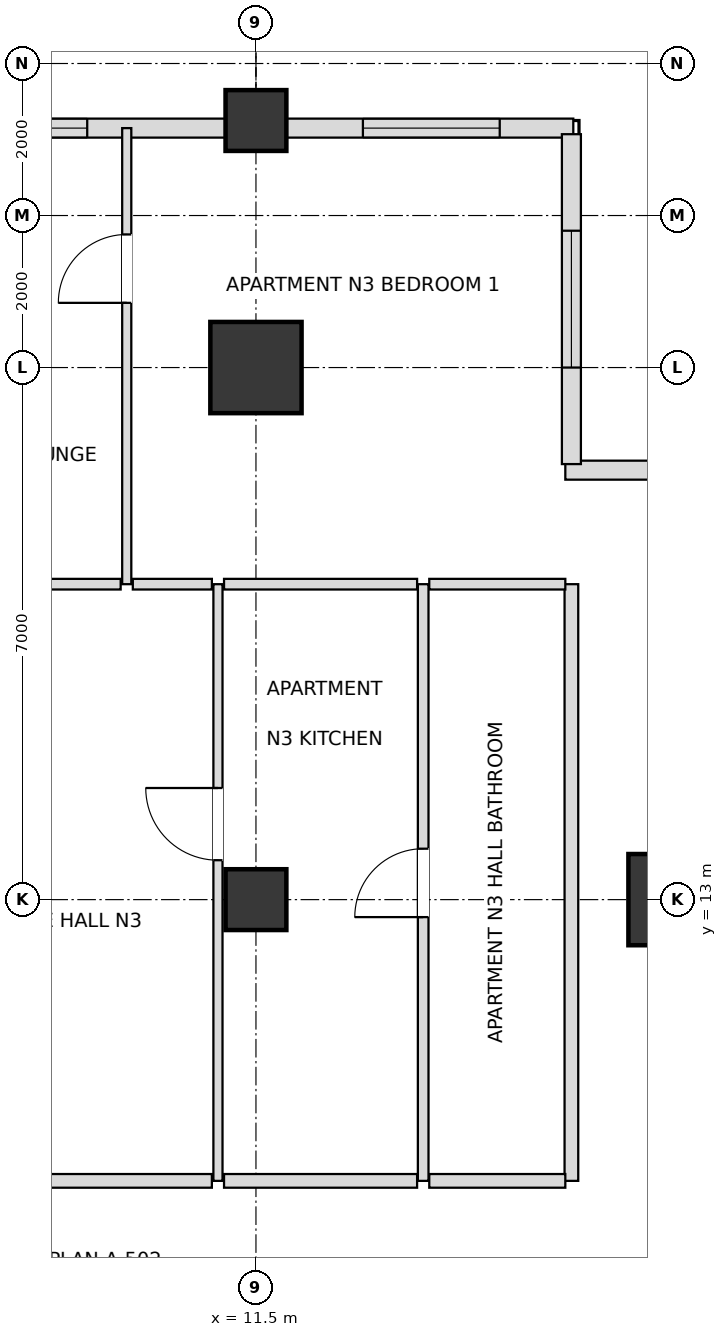
"""IFC4 building model, lengths in metres.
Left out: names, types, materials, properties, quantities, classifications, styles, units other than length and angle.
Written with IfcOpenShell. Run it as: python <this file> out.ifc"""

import sys

from ifc_helpers import new_model, si_unit, direction, frame, frame_2d, origin, origin_2d, place, context, subcontext, project, spatial, rectangle, extrude, element, fill, save


model = new_model("IFC4")
c1 = context("Model", 3, precision=1e-05, world=origin(), true_north=direction((0.0, 1.0)))
c2 = subcontext(c1, "Body", "Model", "MODEL_VIEW")
j1 = project(units=[si_unit("LENGTHUNIT", "METRE"), si_unit("PLANEANGLEUNIT", "RADIAN")], contexts=[c1])
p1 = place(None, origin())
s1 = spatial("IfcSite", under=j1, at=p1, CompositionType="ELEMENT")
p2 = place(p1, origin())
s2 = spatial("IfcBuilding", under=s1, at=p2, CompositionType="ELEMENT")
p3 = place(p2, frame((0.0, 0.0, 109.8)))
s3 = spatial("IfcBuildingStorey", under=s2, at=p3, CompositionType="ELEMENT", Elevation=109.8)
for number, where, z_axis, x_axis in (
    (1, (17.0, 13.0, 0.0), (0.0, 0.0, 1.0), (1.0, 0.0, 0.0)),
    (2, (11.5, 20.0, 0.0), (0.0, 0.0, 1.0), (1.0, 0.0, 0.0)),
):
    element("IfcColumn", number, at=place(p3, frame(where, z_axis=z_axis, x_axis=x_axis)), inside=s3, PredefinedType="USERDEFINED", context=c2, shape_type="SweptSolid", body=[
        extrude(rectangle(XDim=1.2, YDim=1.2, at=origin_2d()), origin(), (0.0, 0.0, 1.0), 3.6),
    ])
for number, where, z_axis, x_axis in (
    (3, (11.5, 13.0, 0.0), (0.0, 0.0, 1.0), (1.0, 0.0, 0.0)),
    (4, (11.5, 23.25, 0.0), (0.0, 0.0, 1.0), (1.0, 0.0, 0.0)),
):
    element("IfcColumn", number, at=place(p3, frame(where, z_axis=z_axis, x_axis=x_axis)), inside=s3, PredefinedType="COLUMN", context=c2, shape_type="SweptSolid", body=[
        extrude(rectangle(XDim=0.8, YDim=0.8, at=origin_2d()), origin(), (0.0, 0.0, 1.0), 3.6),
    ])
p4 = place(p3, frame((15.675, 23.15, 0.0), z_axis=(0.0, 0.0, 1.0), x_axis=(-1.0, 0.0, 0.0)))
e5 = element("IfcWall", 5, at=p4, inside=s3, PredefinedType="SOLIDWALL", context=c2, shape_type="SweptSolid", body=[
    extrude(rectangle(XDim=3.78, YDim=0.25, at=frame_2d((1.89, 0.0))), origin(), (0.0, 0.0, 1.0), 2.736),
])
p5 = place(p4, frame((0.968, 0.0, 0.72)))
e6 = element("IfcOpeningElement", 6, at=p5, cuts=e5, PredefinedType="OPENING", context=c2, shape_type="SweptSolid", body=[
    extrude(rectangle(XDim=1.8, YDim=1.68, at=frame_2d((0.9, 0.84))), frame((0.0, 0.135, 0.0), z_axis=(0.0, -1.0, 0.0), x_axis=(1.0, 0.0, 0.0)), (0.0, 0.0, 1.0), 0.27),
])
p6 = place(p3, frame((11.105, 23.15, 0.0), z_axis=(0.0, 0.0, 1.0), x_axis=(-1.0, 0.0, 0.0)))
e7 = element("IfcWall", 7, at=p6, inside=s3, PredefinedType="SOLIDWALL", context=c2, shape_type="SweptSolid", body=[
    extrude(rectangle(XDim=4.21, YDim=0.25, at=frame_2d((2.105, 0.0))), origin(), (0.0, 0.0, 1.0), 2.736),
])
p7 = place(p6, frame((1.825, 0.0, 0.72)))
e8 = element("IfcOpeningElement", 8, at=p7, cuts=e7, PredefinedType="OPENING", context=c2, shape_type="SweptSolid", body=[
    extrude(rectangle(XDim=1.8, YDim=1.68, at=frame_2d((0.9, 0.84))), frame((0.0, 0.135, 0.0), z_axis=(0.0, -1.0, 0.0), x_axis=(1.0, 0.0, 0.0)), (0.0, 0.0, 1.0), 0.27),
])
p8 = place(p3, frame((20.23, 18.65, 0.0), z_axis=(0.0, 0.0, 1.0), x_axis=(-1.0, 0.0, 0.0)))
e9 = element("IfcWall", 9, at=p8, inside=s3, PredefinedType="SOLIDWALL", context=c2, shape_type="SweptSolid", body=[
    extrude(rectangle(XDim=4.66, YDim=0.25, at=frame_2d((2.33, 0.0))), origin(), (0.0, 0.0, 1.0), 2.736),
])
p9 = place(p8, frame((1.43, 0.0, 0.72)))
e10 = element("IfcOpeningElement", 10, at=p9, cuts=e9, PredefinedType="OPENING", context=c2, shape_type="SweptSolid", body=[
    extrude(rectangle(XDim=1.8, YDim=1.68, at=frame_2d((0.9, 0.84))), frame((0.0, 0.135, 0.0), z_axis=(0.0, -1.0, 0.0), x_axis=(1.0, 0.0, 0.0)), (0.0, 0.0, 1.0), 0.27),
])
p10 = place(p3, frame((15.65, 18.73, 0.0), z_axis=(0.0, 0.0, 1.0), x_axis=(0.0, 1.0, 0.0)))
e11 = element("IfcWall", 11, at=p10, inside=s3, PredefinedType="SOLIDWALL", context=c2, shape_type="SweptSolid", body=[
    extrude(rectangle(XDim=4.34, YDim=0.25, at=frame_2d((2.17, 0.0))), origin(), (0.0, 0.0, 1.0), 2.736),
])
p11 = place(p10, frame((1.27, 0.0, 0.72)))
e12 = element("IfcOpeningElement", 12, at=p11, cuts=e11, PredefinedType="OPENING", context=c2, shape_type="SweptSolid", body=[
    extrude(rectangle(XDim=1.8, YDim=1.68, at=frame_2d((0.9, 0.84))), frame((0.0, 0.135, 0.0), z_axis=(0.0, -1.0, 0.0), x_axis=(1.0, 0.0, 0.0)), (0.0, 0.0, 1.0), 0.27),
])
p12 = place(p3, frame((9.8, 17.15, 0.0), z_axis=(0.0, 0.0, 1.0), x_axis=(0.0, 1.0, 0.0)))
e13 = element("IfcWall", 13, at=p12, inside=s3, PredefinedType="PARTITIONING", context=c2, shape_type="SweptSolid", body=[
    extrude(rectangle(XDim=6.0, YDim=0.12, at=frame_2d((3.0, 0.0))), origin(), (0.0, 0.0, 1.0), 2.816),
])
p13 = place(p12, frame((3.701, 0.0, 0.0)))
e14 = element("IfcOpeningElement", 14, at=p13, cuts=e13, PredefinedType="OPENING", context=c2, shape_type="SweptSolid", body=[
    extrude(rectangle(XDim=0.9, YDim=2.1, at=frame_2d((0.45, 1.05))), frame((0.0, 0.07, 0.0), z_axis=(0.0, -1.0, 0.0), x_axis=(1.0, 0.0, 0.0)), (0.0, 0.0, 1.0), 0.14),
])
p14 = place(p3, frame((11.0, 9.3, 0.0), z_axis=(0.0, 0.0, 1.0), x_axis=(0.0, 1.0, 0.0)))
e15 = element("IfcWall", 15, at=p14, inside=s3, PredefinedType="PARTITIONING", context=c2, shape_type="SweptSolid", body=[
    extrude(rectangle(XDim=7.85, YDim=0.12, at=frame_2d((3.925, 0.0))), origin(), (0.0, 0.0, 1.0), 2.816),
])
p15 = place(p14, frame((4.219, 0.0, 0.0)))
e16 = element("IfcOpeningElement", 16, at=p15, cuts=e15, PredefinedType="OPENING", context=c2, shape_type="SweptSolid", body=[
    extrude(rectangle(XDim=0.95, YDim=2.1, at=frame_2d((0.475, 1.05))), frame((0.0, 0.07, 0.0), z_axis=(0.0, -1.0, 0.0), x_axis=(1.0, 0.0, 0.0)), (0.0, 0.0, 1.0), 0.14),
])
p16 = place(p3, frame((13.7, 9.3, 0.0), z_axis=(0.0, 0.0, 1.0), x_axis=(0.0, 1.0, 0.0)))
e17 = element("IfcWall", 17, at=p16, inside=s3, PredefinedType="PARTITIONING", context=c2, shape_type="SweptSolid", body=[
    extrude(rectangle(XDim=7.85, YDim=0.14, at=frame_2d((3.925, 0.0))), origin(), (0.0, 0.0, 1.0), 2.736),
])
p17 = place(p16, frame((3.47, 0.0, 0.0)))
e18 = element("IfcOpeningElement", 18, at=p17, cuts=e17, PredefinedType="OPENING", context=c2, shape_type="SweptSolid", body=[
    extrude(rectangle(XDim=0.9, YDim=2.1, at=frame_2d((0.45, 1.05))), frame((0.0, 0.08, 0.0), z_axis=(0.0, -1.0, 0.0), x_axis=(1.0, 0.0, 0.0)), (0.0, 0.0, 1.0), 0.16),
])
p18 = place(p3, frame((15.65, 9.3, 0.0), z_axis=(0.0, 0.0, 1.0), x_axis=(0.0, 1.0, 0.0)))
e19 = element("IfcWall", 19, at=p18, inside=s3, PredefinedType="PARTITIONING", context=c2, shape_type="SweptSolid", body=[
    extrude(rectangle(XDim=7.85, YDim=0.18, at=frame_2d((3.925, 0.0))), origin(), (0.0, 0.0, 1.0), 2.736),
])
p19 = place(p3, frame((5.28, 9.3, 0.0), z_axis=(0.0, 0.0, 1.0), x_axis=(1.0, 0.0, 0.0)))
e20 = element("IfcWall", 20, at=p19, inside=s3, PredefinedType="PARTITIONING", context=c2, shape_type="SweptSolid", body=[
    extrude(rectangle(XDim=5.64, YDim=0.18, at=frame_2d((2.82, 0.0))), origin(), (0.0, 0.0, 1.0), 2.816),
])
p20 = place(p19, frame((2.345, 0.0, 0.0)))
e21 = element("IfcOpeningElement", 21, at=p20, cuts=e20, PredefinedType="OPENING", context=c2, shape_type="SweptSolid", body=[
    extrude(rectangle(XDim=0.95, YDim=2.15, at=frame_2d((0.475, 1.075))), frame((0.0, 0.1, 0.0), z_axis=(0.0, -1.0, 0.0), x_axis=(1.0, 0.0, 0.0)), (0.0, 0.0, 1.0), 0.2),
])
p21 = place(p3, frame((11.08, 9.3, 0.0), z_axis=(0.0, 0.0, 1.0), x_axis=(1.0, 0.0, 0.0)))
e22 = element("IfcWall", 22, at=p21, inside=s3, PredefinedType="PARTITIONING", context=c2, shape_type="SweptSolid", body=[
    extrude(rectangle(XDim=2.54, YDim=0.18, at=frame_2d((1.27, 0.0))), origin(), (0.0, 0.0, 1.0), 3.38),
])
p22 = place(p3, frame((13.78, 9.3, 0.0), z_axis=(0.0, 0.0, 1.0), x_axis=(1.0, 0.0, 0.0)))
e23 = element("IfcWall", 23, at=p22, inside=s3, PredefinedType="PARTITIONING", context=c2, shape_type="SweptSolid", body=[
    extrude(rectangle(XDim=1.79, YDim=0.18, at=frame_2d((0.895, 0.0))), origin(), (0.0, 0.0, 1.0), 3.38),
])
p23 = place(p3, frame((5.28, 17.15, 0.0), z_axis=(0.0, 0.0, 1.0), x_axis=(1.0, 0.0, 0.0)))
e24 = element("IfcWall", 24, at=p23, inside=s3, PredefinedType="PARTITIONING", context=c2, shape_type="SweptSolid", body=[
    extrude(rectangle(XDim=4.44, YDim=0.14, at=frame_2d((2.22, 0.0))), origin(), (0.0, 0.0, 1.0), 2.816),
])
p24 = place(p23, frame((1.765, 0.0, 0.0)))
e25 = element("IfcOpeningElement", 25, at=p24, cuts=e24, PredefinedType="OPENING", context=c2, shape_type="SweptSolid", body=[
    extrude(rectangle(XDim=0.95, YDim=2.1, at=frame_2d((0.475, 1.05))), frame((0.0, 0.08, 0.0), z_axis=(0.0, -1.0, 0.0), x_axis=(1.0, 0.0, 0.0)), (0.0, 0.0, 1.0), 0.16),
])
p25 = place(p3, frame((9.88, 17.15, 0.0), z_axis=(0.0, 0.0, 1.0), x_axis=(1.0, 0.0, 0.0)))
e26 = element("IfcWall", 26, at=p25, inside=s3, PredefinedType="PARTITIONING", context=c2, shape_type="SweptSolid", body=[
    extrude(rectangle(XDim=1.04, YDim=0.14, at=frame_2d((0.52, 0.0))), origin(), (0.0, 0.0, 1.0), 3.38),
])
p26 = place(p3, frame((11.08, 17.15, 0.0), z_axis=(0.0, 0.0, 1.0), x_axis=(1.0, 0.0, 0.0)))
e27 = element("IfcWall", 27, at=p26, inside=s3, PredefinedType="PARTITIONING", context=c2, shape_type="SweptSolid", body=[
    extrude(rectangle(XDim=2.54, YDim=0.14, at=frame_2d((1.27, 0.0))), origin(), (0.0, 0.0, 1.0), 2.736),
])
p27 = place(p3, frame((13.78, 17.15, 0.0), z_axis=(0.0, 0.0, 1.0), x_axis=(1.0, 0.0, 0.0)))
e28 = element("IfcWall", 28, at=p27, inside=s3, PredefinedType="PARTITIONING", context=c2, shape_type="SweptSolid", body=[
    extrude(rectangle(XDim=1.79, YDim=0.14, at=frame_2d((0.895, 0.0))), origin(), (0.0, 0.0, 1.0), 2.736),
])
p28 = place(p5, origin())
e29 = element("IfcWindow", 29, at=p28, inside=s3, PartitioningType="SINGLE_PANEL", PredefinedType="WINDOW", context=c2, shape_type="SweptSolid", body=[
    extrude(rectangle(XDim=1.8, YDim=1.68, at=frame_2d((0.9, 0.84))), frame((0.0, 0.03, 0.0), z_axis=(0.0, -1.0, 0.0), x_axis=(1.0, 0.0, 0.0)), (0.0, 0.0, 1.0), 0.06),
])
fill(e6, e29)
p29 = place(p7, origin())
e30 = element("IfcWindow", 30, at=p29, inside=s3, PartitioningType="SINGLE_PANEL", PredefinedType="WINDOW", context=c2, shape_type="SweptSolid", body=[
    extrude(rectangle(XDim=1.8, YDim=1.68, at=frame_2d((0.9, 0.84))), frame((0.0, 0.03, 0.0), z_axis=(0.0, -1.0, 0.0), x_axis=(1.0, 0.0, 0.0)), (0.0, 0.0, 1.0), 0.06),
])
fill(e8, e30)
p30 = place(p11, origin())
e31 = element("IfcWindow", 31, at=p30, inside=s3, PartitioningType="SINGLE_PANEL", PredefinedType="WINDOW", context=c2, shape_type="SweptSolid", body=[
    extrude(rectangle(XDim=1.8, YDim=1.68, at=frame_2d((0.9, 0.84))), frame((0.0, 0.03, 0.0), z_axis=(0.0, -1.0, 0.0), x_axis=(1.0, 0.0, 0.0)), (0.0, 0.0, 1.0), 0.06),
])
fill(e12, e31)
p31 = place(p15, origin())
e32 = element("IfcDoor", 32, at=p31, inside=s3, OperationType="SINGLE_SWING_RIGHT", PredefinedType="DOOR", context=c2, shape_type="SweptSolid", body=[
    extrude(rectangle(XDim=0.95, YDim=2.1, at=frame_2d((0.475, 1.05))), frame((0.0, 0.025, 0.0), z_axis=(0.0, -1.0, 0.0), x_axis=(1.0, 0.0, 0.0)), (0.0, 0.0, 1.0), 0.05),
])
fill(e16, e32)
p32 = place(p17, origin())
e33 = element("IfcDoor", 33, at=p32, inside=s3, OperationType="SINGLE_SWING_LEFT", PredefinedType="DOOR", context=c2, shape_type="SweptSolid", body=[
    extrude(rectangle(XDim=0.9, YDim=2.1, at=frame_2d((0.45, 1.05))), frame((0.0, 0.025, 0.0), z_axis=(0.0, -1.0, 0.0), x_axis=(1.0, 0.0, 0.0)), (0.0, 0.0, 1.0), 0.05),
])
fill(e18, e33)
p33 = place(p13, origin())
e34 = element("IfcDoor", 34, at=p33, inside=s3, OperationType="SINGLE_SWING_LEFT", PredefinedType="DOOR", context=c2, shape_type="SweptSolid", body=[
    extrude(rectangle(XDim=0.9, YDim=2.1, at=frame_2d((0.45, 1.05))), frame((0.0, 0.025, 0.0), z_axis=(0.0, -1.0, 0.0), x_axis=(1.0, 0.0, 0.0)), (0.0, 0.0, 1.0), 0.05),
])
fill(e14, e34)
save(model, sys.argv[1])
